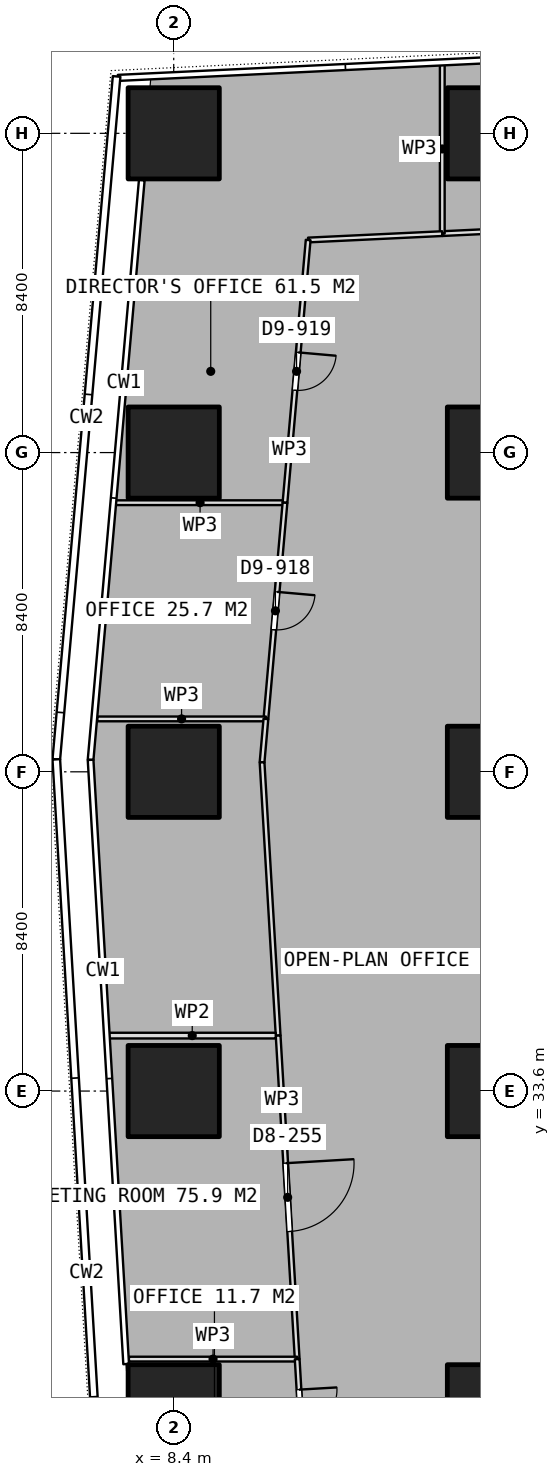
"""IFC4 building model, lengths in metres.
Left out: names, types, materials, properties, quantities, classifications, styles, units other than length and angle.
Written with IfcOpenShell. Run it as: python <this file> out.ifc"""

import sys

from ifc_helpers import new_model, si_unit, direction, frame, frame_2d, origin, origin_2d, place, context, subcontext, project, spatial, rectangle, extrude, element, fill, save


model = new_model("IFC4")
c1 = context("Model", 3, precision=1e-05, world=origin(), true_north=direction((0.0, 1.0)))
c2 = subcontext(c1, "Body", "Model", "MODEL_VIEW")
j1 = project(units=[si_unit("LENGTHUNIT", "METRE"), si_unit("PLANEANGLEUNIT", "RADIAN")], contexts=[c1])
p1 = place(None, origin())
s1 = spatial("IfcSite", under=j1, at=p1, CompositionType="ELEMENT")
p2 = place(p1, origin())
s2 = spatial("IfcBuilding", under=s1, at=p2, CompositionType="ELEMENT")
p3 = place(p2, frame((0.0, 0.0, 232.7)))
s3 = spatial("IfcBuildingStorey", under=s2, at=p3, CompositionType="ELEMENT", Elevation=232.7)
for number, where, z_axis, x_axis in (
    (1, (8.4, 25.2, 0.0), (0.0, 0.0, 1.0), (1.0, 0.0, 0.0)),
    (2, (8.4, 33.6, 0.0), (0.0, 0.0, 1.0), (1.0, 0.0, 0.0)),
    (3, (8.4, 42.0, 0.0), (0.0, 0.0, 1.0), (1.0, 0.0, 0.0)),
    (4, (8.4, 50.4, 0.0), (0.0, 0.0, 1.0), (1.0, 0.0, 0.0)),
    (5, (8.4, 58.8, 0.0), (0.0, 0.0, 1.0), (1.0, 0.0, 0.0)),
    (6, (16.8, 25.2, 0.0), (0.0, 0.0, 1.0), (1.0, 0.0, 0.0)),
    (7, (16.8, 33.6, 0.0), (0.0, 0.0, 1.0), (1.0, 0.0, 0.0)),
    (8, (16.8, 42.0, 0.0), (0.0, 0.0, 1.0), (1.0, 0.0, 0.0)),
    (9, (16.8, 50.4, 0.0), (0.0, 0.0, 1.0), (1.0, 0.0, 0.0)),
    (10, (16.8, 58.8, 0.0), (0.0, 0.0, 1.0), (1.0, 0.0, 0.0)),
):
    element("IfcColumn", number, at=place(p3, frame(where, z_axis=z_axis, x_axis=x_axis)), inside=s3, PredefinedType="COLUMN", context=c2, shape_type="SweptSolid", body=[
        extrude(rectangle(XDim=2.4, YDim=2.4, at=origin_2d()), origin(), (0.0, 0.0, 1.0), 3.75),
    ])
p4 = place(p3, frame((23.792, 56.559, 0.0), z_axis=(0.0, 0.0, 1.0), x_axis=(-0.998858041753, -0.047776693337, 0.0)))
e11 = element("IfcWall", 11, at=p4, inside=s3, PredefinedType="PARTITIONING", context=c2, shape_type="SweptSolid", body=[
    extrude(rectangle(XDim=8.334, YDim=0.125, at=frame_2d((4.167, 0.0))), origin(), (0.0, 0.0, 1.0), 3.5),
])
p5 = place(p3, frame((15.467, 56.161, 0.0), z_axis=(0.0, 0.0, 1.0), x_axis=(0.0, 1.0, 0.0)))
e12 = element("IfcWall", 12, at=p5, inside=s3, PredefinedType="PARTITIONING", context=c2, shape_type="SweptSolid", body=[
    extrude(rectangle(XDim=4.456, YDim=0.125, at=frame_2d((2.228, 0.0))), origin(), (0.0, 0.0, 1.0), 3.5),
])
p6 = place(p3, frame((11.328, 49.081, 0.0), z_axis=(0.0, 0.0, 1.0), x_axis=(-1.0, 0.0, 0.0)))
e13 = element("IfcWall", 13, at=p6, inside=s3, PredefinedType="PARTITIONING", context=c2, shape_type="SweptSolid", body=[
    extrude(rectangle(XDim=4.468, YDim=0.125, at=frame_2d((2.234, 0.0))), origin(), (0.0, 0.0, 1.0), 3.5),
])
p7 = place(p3, frame((15.466, 56.161, 0.0), z_axis=(0.0, 0.0, 1.0), x_axis=(-0.998868606823, -0.047555297315, 0.0)))
e14 = element("IfcWall", 14, at=p7, inside=s3, PredefinedType="PARTITIONING", context=c2, shape_type="SweptSolid", body=[
    extrude(rectangle(XDim=3.532, YDim=0.125, at=frame_2d((1.766, 0.0))), origin(), (0.0, 0.0, 1.0), 3.5),
])
p8 = place(p3, frame((11.938, 55.993, 0.0), z_axis=(0.0, 0.0, 1.0), x_axis=(-0.087927696719, -0.996126859466, 0.0)))
e15 = element("IfcWall", 15, at=p8, inside=s3, PredefinedType="PARTITIONING", context=c2, shape_type="SweptSolid", body=[
    extrude(rectangle(XDim=6.939, YDim=0.125, at=frame_2d((3.469, 0.0))), origin(), (0.0, 0.0, 1.0), 3.5),
])
p9 = place(p8, frame((2.969, 0.0, 0.0)))
e16 = element("IfcOpeningElement", 16, at=p9, cuts=e15, PredefinedType="OPENING", context=c2, shape_type="SweptSolid", body=[
    extrude(rectangle(XDim=1.0, YDim=2.1, at=frame_2d((0.5, 1.05))), frame((0.0, 0.073, 0.0), z_axis=(0.0, -1.0, 0.0), x_axis=(1.0, 0.0, 0.0)), (0.0, 0.0, 1.0), 0.145),
])
p10 = place(p3, frame((11.328, 49.08, 0.0), z_axis=(0.0, 0.0, 1.0), x_axis=(-0.087906288429, -0.996128748935, 0.0)))
e17 = element("IfcWall", 17, at=p10, inside=s3, PredefinedType="PARTITIONING", context=c2, shape_type="SweptSolid", body=[
    extrude(rectangle(XDim=5.71, YDim=0.125, at=frame_2d((2.855, 0.0))), origin(), (0.0, 0.0, 1.0), 3.5),
])
p11 = place(p10, frame((2.355, 0.0, 0.0)))
e18 = element("IfcOpeningElement", 18, at=p11, cuts=e17, PredefinedType="OPENING", context=c2, shape_type="SweptSolid", body=[
    extrude(rectangle(XDim=1.0, YDim=2.1, at=frame_2d((0.5, 1.05))), frame((0.0, 0.073, 0.0), z_axis=(0.0, -1.0, 0.0), x_axis=(1.0, 0.0, 0.0)), (0.0, 0.0, 1.0), 0.145),
])
p12 = place(p3, frame((10.826, 43.392, 0.0), z_axis=(0.0, 0.0, 1.0), x_axis=(-1.0, 0.0, 0.0)))
e19 = element("IfcWall", 19, at=p12, inside=s3, PredefinedType="PARTITIONING", context=c2, shape_type="SweptSolid", body=[
    extrude(rectangle(XDim=4.438, YDim=0.125, at=frame_2d((2.219, 0.0))), origin(), (0.0, 0.0, 1.0), 3.5),
])
p13 = place(p3, frame((10.826, 43.391, 0.0), z_axis=(0.0, 0.0, 1.0), x_axis=(-0.087943526258, -0.996125462073, 0.0)))
e20 = element("IfcWall", 20, at=p13, inside=s3, PredefinedType="PARTITIONING", context=c2, shape_type="SweptSolid", body=[
    extrude(rectangle(XDim=1.146, YDim=0.125, at=frame_2d((0.573, 0.0))), origin(), (0.0, 0.0, 1.0), 3.5),
])
p14 = place(p3, frame((10.725, 42.249, 0.0), z_axis=(0.0, 0.0, 1.0), x_axis=(0.058718047248, -0.998274606973, 0.0)))
e21 = element("IfcWall", 21, at=p14, inside=s3, PredefinedType="PARTITIONING", context=c2, shape_type="SweptSolid", body=[
    extrude(rectangle(XDim=7.201, YDim=0.125, at=frame_2d((3.601, 0.0))), origin(), (0.0, 0.0, 1.0), 3.5),
])
p15 = place(p3, frame((11.148, 35.06, 0.0), z_axis=(0.0, 0.0, 1.0), x_axis=(0.058747195918, -0.998272892035, 0.0)))
e22 = element("IfcWall", 22, at=p15, inside=s3, PredefinedType="PARTITIONING", context=c2, shape_type="SweptSolid", body=[
    extrude(rectangle(XDim=8.528, YDim=0.125, at=frame_2d((4.264, 0.0))), origin(), (0.0, 0.0, 1.0), 3.5),
])
p16 = place(p15, frame((3.364, 0.0, 0.0)))
e23 = element("IfcOpeningElement", 23, at=p16, cuts=e22, PredefinedType="OPENING", context=c2, shape_type="SweptSolid", body=[
    extrude(rectangle(XDim=1.8, YDim=2.1, at=frame_2d((0.9, 1.05))), frame((0.0, 0.073, 0.0), z_axis=(0.0, -1.0, 0.0), x_axis=(1.0, 0.0, 0.0)), (0.0, 0.0, 1.0), 0.145),
])
p17 = place(p3, frame((11.649, 26.547, 0.0), z_axis=(0.0, 0.0, 1.0), x_axis=(-1.0, 0.0, 0.0)))
e24 = element("IfcWall", 24, at=p17, inside=s3, PredefinedType="PARTITIONING", context=c2, shape_type="SweptSolid", body=[
    extrude(rectangle(XDim=4.428, YDim=0.125, at=frame_2d((2.214, 0.0))), origin(), (0.0, 0.0, 1.0), 3.5),
])
p18 = place(p3, frame((11.649, 26.546, 0.0), z_axis=(0.0, 0.0, 1.0), x_axis=(0.058711043696, -0.998275018894, 0.0)))
e25 = element("IfcWall", 25, at=p18, inside=s3, PredefinedType="PARTITIONING", context=c2, shape_type="SweptSolid", body=[
    extrude(rectangle(XDim=2.607, YDim=0.125, at=frame_2d((1.304, 0.0))), origin(), (0.0, 0.0, 1.0), 3.5),
])
p19 = place(p18, frame((0.804, 0.0, 0.0)))
e26 = element("IfcOpeningElement", 26, at=p19, cuts=e25, PredefinedType="OPENING", context=c2, shape_type="SweptSolid", body=[
    extrude(rectangle(XDim=1.0, YDim=2.1, at=frame_2d((0.5, 1.05))), frame((0.0, 0.073, 0.0), z_axis=(0.0, -1.0, 0.0), x_axis=(1.0, 0.0, 0.0)), (0.0, 0.0, 1.0), 0.145),
])
p20 = place(p3, frame((11.085, 35.059, 0.0), z_axis=(0.0, 0.0, 1.0), x_axis=(-1.0, 0.0, 0.0)))
e27 = element("IfcWall", 27, at=p20, inside=s3, PredefinedType="PARTITIONING", context=c2, shape_type="SweptSolid", body=[
    extrude(rectangle(XDim=4.395, YDim=0.15, at=frame_2d((2.198, 0.0))), origin(), (0.0, 0.0, 1.0), 3.5),
])
p21 = place(p9, origin())
e28 = element("IfcDoor", 28, at=p21, inside=s3, OperationType="SINGLE_SWING_LEFT", PredefinedType="DOOR", context=c2, shape_type="SweptSolid", body=[
    extrude(rectangle(XDim=1.0, YDim=2.1, at=frame_2d((0.5, 1.05))), frame((0.0, 0.025, 0.0), z_axis=(0.0, -1.0, 0.0), x_axis=(1.0, 0.0, 0.0)), (0.0, 0.0, 1.0), 0.05),
])
fill(e16, e28)
p22 = place(p11, origin())
e29 = element("IfcDoor", 29, at=p22, inside=s3, OperationType="SINGLE_SWING_LEFT", PredefinedType="DOOR", context=c2, shape_type="SweptSolid", body=[
    extrude(rectangle(XDim=1.0, YDim=2.1, at=frame_2d((0.5, 1.05))), frame((0.0, 0.025, 0.0), z_axis=(0.0, -1.0, 0.0), x_axis=(1.0, 0.0, 0.0)), (0.0, 0.0, 1.0), 0.05),
])
fill(e18, e29)
p23 = place(p16, origin())
e30 = element("IfcDoor", 30, at=p23, inside=s3, OperationType="DOUBLE_DOOR_SINGLE_SWING", PredefinedType="DOOR", context=c2, shape_type="SweptSolid", body=[
    extrude(rectangle(XDim=1.8, YDim=2.1, at=frame_2d((0.9, 1.05))), frame((0.0, 0.025, 0.0), z_axis=(0.0, -1.0, 0.0), x_axis=(1.0, 0.0, 0.0)), (0.0, 0.0, 1.0), 0.05),
])
fill(e23, e30)
p24 = place(p19, origin())
e31 = element("IfcDoor", 31, at=p24, inside=s3, OperationType="SINGLE_SWING_LEFT", PredefinedType="DOOR", context=c2, shape_type="SweptSolid", body=[
    extrude(rectangle(XDim=1.0, YDim=2.1, at=frame_2d((0.5, 1.05))), frame((0.0, 0.025, 0.0), z_axis=(0.0, -1.0, 0.0), x_axis=(1.0, 0.0, 0.0)), (0.0, 0.0, 1.0), 0.05),
])
fill(e26, e31)
save(model, sys.argv[1])
